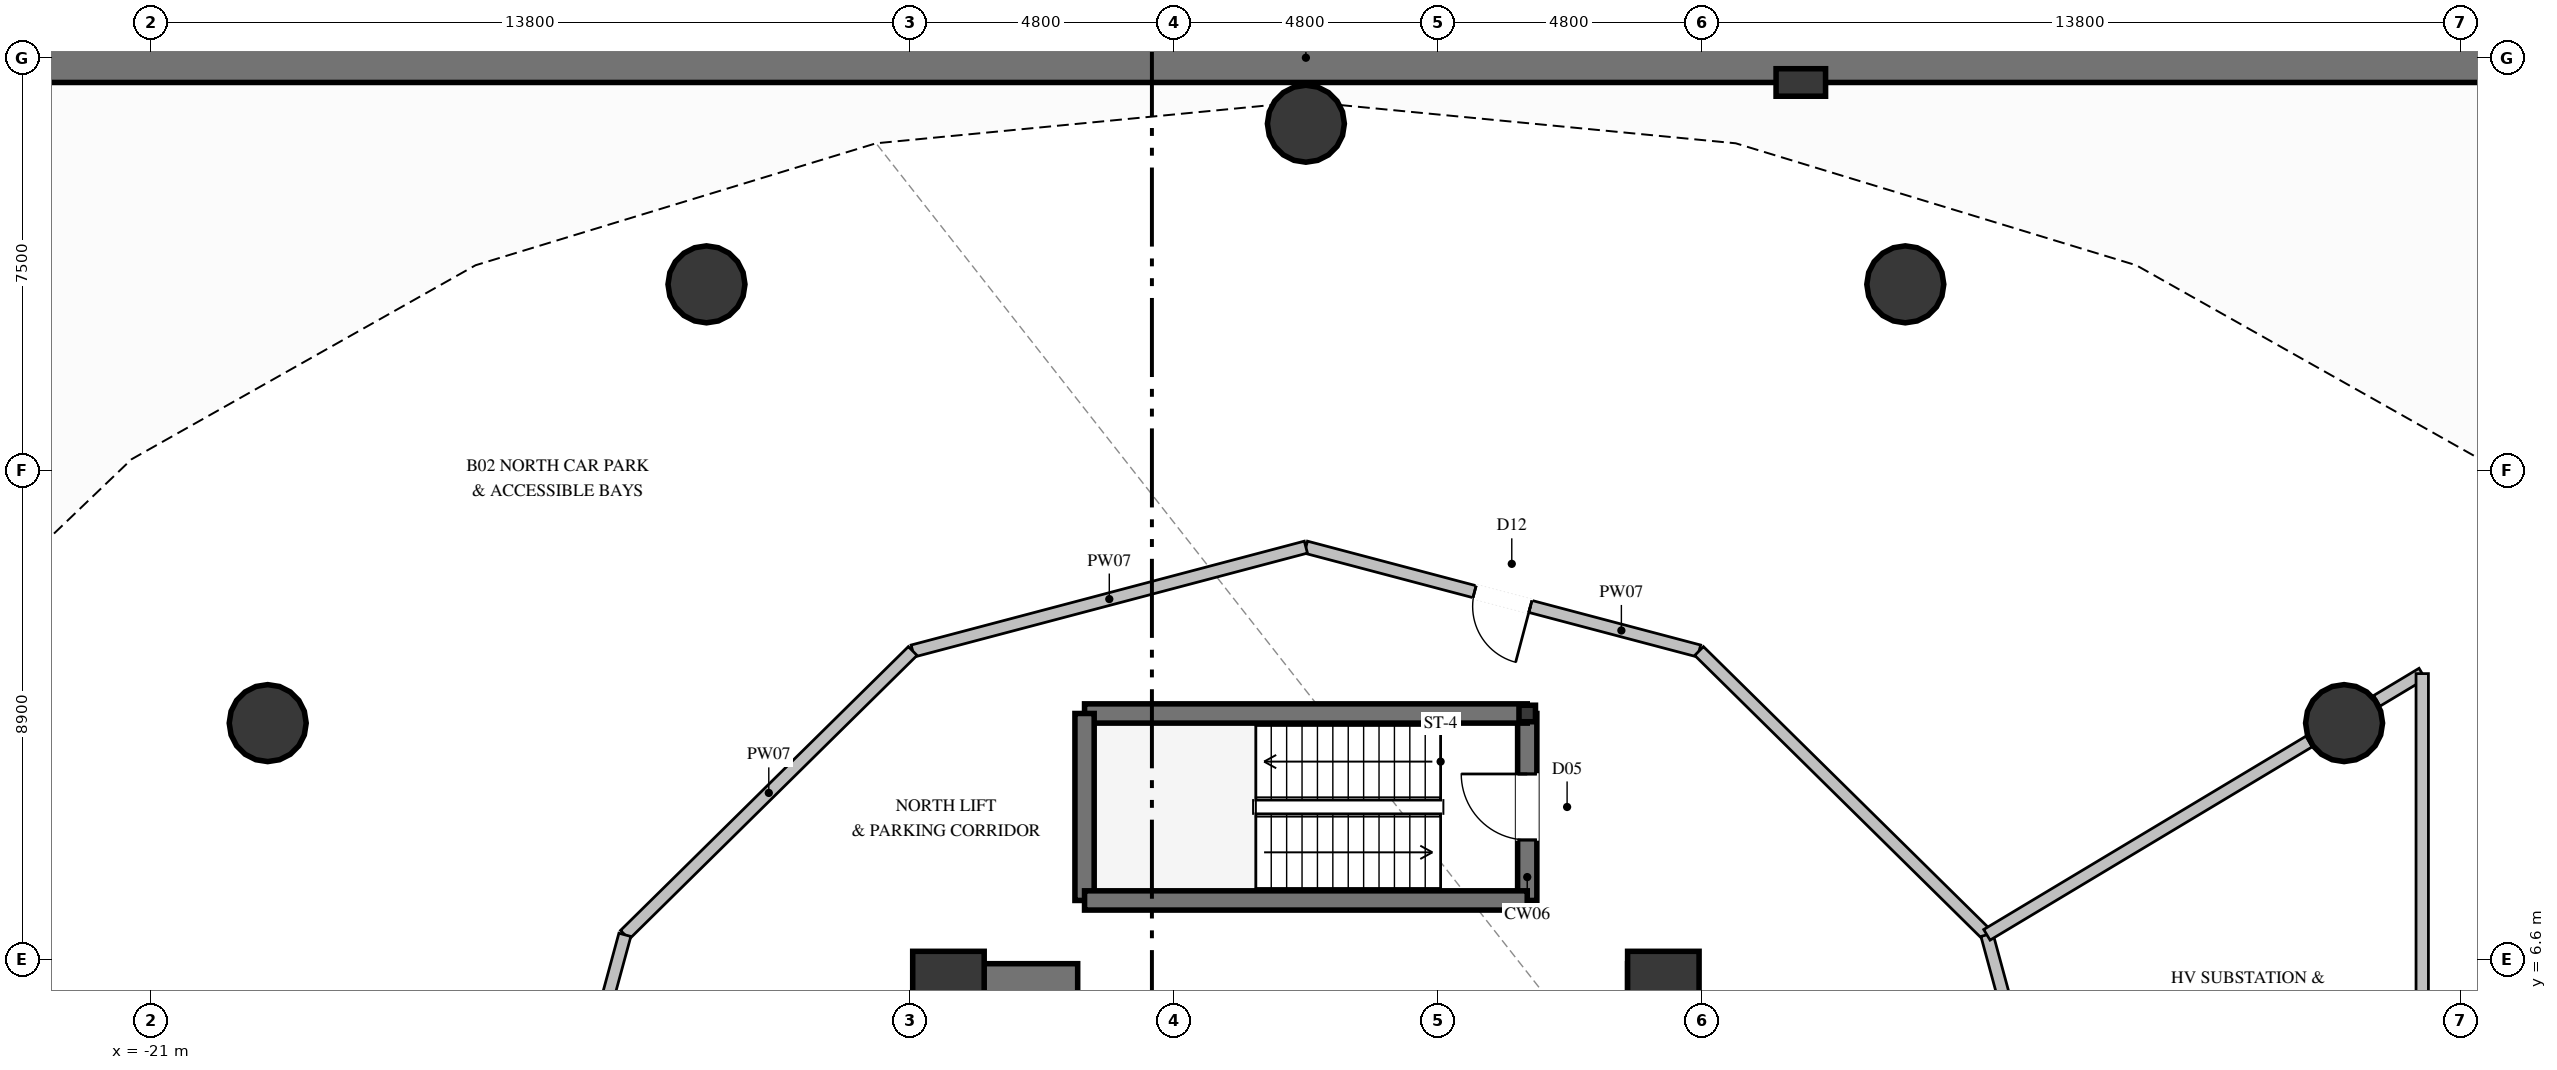
"""IFC4 building model, lengths in metres.
Left out: names, types, materials, properties, quantities, classifications, styles, units other than length and angle.
Written with IfcOpenShell. Run it as: python <this file> out.ifc"""

import sys

from ifc_helpers import new_model, si_unit, direction, frame, frame_2d, origin, origin_2d, place, context, subcontext, project, spatial, rectangle, hollow_rectangle, circle, extrude, element, fill, save


model = new_model("IFC4")
c1 = context("Model", 3, precision=1e-05, world=origin(), true_north=direction((0.0, 1.0)))
c2 = subcontext(c1, "Body", "Model", "MODEL_VIEW")
j1 = project(units=[si_unit("LENGTHUNIT", "METRE"), si_unit("PLANEANGLEUNIT", "RADIAN")], contexts=[c1])
p1 = place(None, origin())
s1 = spatial("IfcSite", under=j1, at=p1, CompositionType="ELEMENT")
p2 = place(p1, origin())
s2 = spatial("IfcBuilding", under=s1, at=p2, CompositionType="ELEMENT")
p3 = place(p2, frame((0.0, 0.0, -9.6)))
s3 = spatial("IfcBuildingStorey", under=s2, at=p3, CompositionType="ELEMENT", Elevation=-9.6)
p4 = place(p3, frame((31.45, 23.0, 0.0), z_axis=(0.0, 0.0, 1.0), x_axis=(-1.0, 0.0, 0.0)))
e1 = element("IfcWall", 1, at=p4, inside=s3, PredefinedType="SHEAR", context=c2, shape_type="SweptSolid", body=[
    extrude(rectangle(XDim=62.9, YDim=0.9, at=frame_2d((31.45, 0.0))), origin(), (0.0, 0.0, 1.0), 4.8),
])
p5 = place(p3, frame((9.0, 22.55, 0.0), z_axis=(0.0, 0.0, 1.0), x_axis=(0.0, 1.0, 0.0)))
e2 = element("IfcColumn", 2, at=p5, inside=s3, PredefinedType="PILASTER", context=c2, shape_type="SweptSolid", body=[
    extrude(rectangle(XDim=0.5, YDim=0.9, at=origin_2d()), origin(), (0.0, 0.0, 1.0), 4.8),
])
for number, where, z_axis, x_axis in (
    (3, (6.5, 6.1, 0.0), (0.0, 0.0, 1.0), (1.0, 0.0, 0.0)),
    (4, (-6.5, 6.1, 0.0), (0.0, 0.0, 1.0), (1.0, 0.0, 0.0)),
):
    element("IfcColumn", number, at=place(p3, frame(where, z_axis=z_axis, x_axis=x_axis)), inside=s3, PredefinedType="COLUMN", context=c2, shape_type="SweptSolid", body=[
        extrude(rectangle(XDim=1.3, YDim=1.3, at=origin_2d()), origin(), (0.0, 0.0, 1.0), 4.8),
    ])
p6 = place(p3, frame((-6.075, 6.1, 0.0), z_axis=(0.0, 0.0, 1.0), x_axis=(1.0, 0.0, 0.0)))
e5 = element("IfcWall", 5, at=p6, inside=s3, PredefinedType="SHEAR", context=c2, shape_type="SweptSolid", body=[
    extrude(rectangle(XDim=1.925, YDim=0.85, at=frame_2d((0.962, 0.0))), origin(), (0.0, 0.0, 1.0), 4.8),
])
p7 = place(p3, frame((5.85, 6.1, 0.0), z_axis=(0.0, 0.0, 1.0), x_axis=(1.0, 0.0, 0.0)))
e6 = element("IfcWall", 6, at=p7, inside=s3, PredefinedType="SHEAR", context=c2, shape_type="SweptSolid", body=[
    extrude(rectangle(XDim=0.225, YDim=0.85, at=frame_2d((0.112, 0.0))), origin(), (0.0, 0.0, 1.0), 4.8),
])
p8 = place(p3, frame((-6.5, 2.35, 0.0), z_axis=(0.0, 0.0, 1.0), x_axis=(0.0, 1.0, 0.0)))
e7 = element("IfcWall", 7, at=p8, inside=s3, PredefinedType="SHEAR", context=c2, shape_type="SweptSolid", body=[
    extrude(rectangle(XDim=4.175, YDim=0.85, at=frame_2d((2.087, 0.0))), origin(), (0.0, 0.0, 1.0), 4.8),
])
p9 = place(p3, frame((6.5, 3.35, 0.0), z_axis=(0.0, 0.0, 1.0), x_axis=(0.0, 1.0, 0.0)))
e8 = element("IfcWall", 8, at=p9, inside=s3, PredefinedType="SHEAR", context=c2, shape_type="SweptSolid", body=[
    extrude(rectangle(XDim=3.175, YDim=0.85, at=frame_2d((1.587, 0.0))), origin(), (0.0, 0.0, 1.0), 4.8),
])
for number, where, z_axis, x_axis in (
    (9, (18.879, 10.9, 0.0), (0.0, 0.0, 1.0), (1.0, 0.0, 0.0)),
    (10, (10.9, 18.879, 0.0), (0.0, 0.0, 1.0), (1.0, 0.0, 0.0)),
    (11, (0.0, 21.8, 0.0), (0.0, 0.0, 1.0), (1.0, 0.0, 0.0)),
    (12, (-10.9, 18.879, 0.0), (0.0, 0.0, 1.0), (1.0, 0.0, 0.0)),
    (13, (-18.879, 10.9, 0.0), (0.0, 0.0, 1.0), (1.0, 0.0, 0.0)),
):
    element("IfcColumn", number, at=place(p3, frame(where, z_axis=z_axis, x_axis=x_axis)), inside=s3, PredefinedType="COLUMN", context=c2, shape_type="SweptSolid", body=[
        extrude(circle(Radius=0.7, at=origin_2d()), origin(), (0.0, 0.0, 1.0), 4.8),
    ])
p10 = place(p3, frame((4.025, 11.075, 0.0), z_axis=(0.0, 0.0, 1.0), x_axis=(1.0, 0.0, 0.0)))
e14 = element("IfcColumn", 14, at=p10, inside=s3, PredefinedType="COLUMN", context=c2, shape_type="SweptSolid", body=[
    extrude(hollow_rectangle(XDim=0.3, YDim=0.3, WallThickness=0.016, at=origin_2d()), origin(), (0.0, 0.0, 1.0), 4.8),
])
p11 = place(p3, frame((4.025, 7.675, 0.0), z_axis=(0.0, 0.0, 1.0), x_axis=(0.0, 1.0, 0.0)))
e15 = element("IfcWall", 15, at=p11, inside=s3, PredefinedType="SOLIDWALL", context=c2, shape_type="SweptSolid", body=[
    extrude(rectangle(XDim=3.4, YDim=0.35, at=frame_2d((1.7, 0.0))), origin(), (0.0, 0.0, 1.0), 4.46),
])
p12 = place(p11, frame((1.1, 0.0, 0.0)))
e16 = element("IfcOpeningElement", 16, at=p12, cuts=e15, PredefinedType="OPENING", context=c2, shape_type="SweptSolid", body=[
    extrude(rectangle(XDim=1.2, YDim=2.2, at=frame_2d((0.6, 1.1))), frame((0.0, 0.185, 0.0), z_axis=(0.0, -1.0, 0.0), x_axis=(1.0, 0.0, 0.0)), (0.0, 0.0, 1.0), 0.37),
])
p13 = place(p3, frame((4.025, 11.075, 0.0), z_axis=(0.0, 0.0, 1.0), x_axis=(-1.0, 0.0, 0.0)))
e17 = element("IfcWall", 17, at=p13, inside=s3, PredefinedType="SOLIDWALL", context=c2, shape_type="SweptSolid", body=[
    extrude(rectangle(XDim=8.05, YDim=0.35, at=frame_2d((4.025, 0.0))), origin(), (0.0, 0.0, 1.0), 4.46),
])
p14 = place(p3, frame((-4.025, 11.075, 0.0), z_axis=(0.0, 0.0, 1.0), x_axis=(0.0, -1.0, 0.0)))
e18 = element("IfcWall", 18, at=p14, inside=s3, PredefinedType="SOLIDWALL", context=c2, shape_type="SweptSolid", body=[
    extrude(rectangle(XDim=3.4, YDim=0.35, at=frame_2d((1.7, 0.0))), origin(), (0.0, 0.0, 1.0), 4.46),
])
p15 = place(p3, frame((-4.025, 7.675, 0.0), z_axis=(0.0, 0.0, 1.0), x_axis=(1.0, 0.0, 0.0)))
e19 = element("IfcWall", 19, at=p15, inside=s3, PredefinedType="SOLIDWALL", context=c2, shape_type="SweptSolid", body=[
    extrude(rectangle(XDim=8.05, YDim=0.35, at=frame_2d((4.025, 0.0))), origin(), (0.0, 0.0, 1.0), 4.46),
])
p16 = place(p3, frame((7.15, 12.211, 0.0), z_axis=(0.0, 0.0, 1.0), x_axis=(-0.966820901533, 0.255455170937, 0.0)))
e20 = element("IfcWall", 20, at=p16, inside=s3, PredefinedType="PARTITIONING", context=c2, shape_type="SweptSolid", body=[
    extrude(rectangle(XDim=7.395, YDim=0.225, at=frame_2d((3.698, 0.0))), origin(), (0.0, 0.0, 1.0), 4.46),
])
p17 = place(p16, frame((3.173, 0.0, 0.0)))
e21 = element("IfcOpeningElement", 21, at=p17, cuts=e20, PredefinedType="OPENING", context=c2, shape_type="SweptSolid", body=[
    extrude(rectangle(XDim=1.05, YDim=2.15, at=frame_2d((0.525, 1.075))), frame((0.0, 0.123, 0.0), z_axis=(0.0, -1.0, 0.0), x_axis=(1.0, 0.0, 0.0)), (0.0, 0.0, 1.0), 0.245),
])
p18 = place(p3, frame((12.384, 7.05, 0.0), z_axis=(0.0, 0.0, 1.0), x_axis=(-0.712071304345, 0.702107155303, 0.0)))
e22 = element("IfcWall", 22, at=p18, inside=s3, PredefinedType="PARTITIONING", context=c2, shape_type="SweptSolid", body=[
    extrude(rectangle(XDim=7.351, YDim=0.225, at=frame_2d((3.675, 0.0))), origin(), (0.0, 0.0, 1.0), 4.46),
])
p19 = place(p3, frame((0.0, 14.1, 0.0), z_axis=(0.0, 0.0, 1.0), x_axis=(-0.966820901533, -0.255455170937, 0.0)))
e23 = element("IfcWall", 23, at=p19, inside=s3, PredefinedType="PARTITIONING", context=c2, shape_type="SweptSolid", body=[
    extrude(rectangle(XDim=7.395, YDim=0.225, at=frame_2d((3.698, 0.0))), origin(), (0.0, 0.0, 1.0), 4.46),
])
p20 = place(p3, frame((-7.15, 12.211, 0.0), z_axis=(0.0, 0.0, 1.0), x_axis=(-0.712071304345, -0.702107155303, 0.0)))
e24 = element("IfcWall", 24, at=p20, inside=s3, PredefinedType="PARTITIONING", context=c2, shape_type="SweptSolid", body=[
    extrude(rectangle(XDim=7.351, YDim=0.225, at=frame_2d((3.675, 0.0))), origin(), (0.0, 0.0, 1.0), 4.46),
])
p21 = place(p3, frame((-12.384, 7.05, 0.0), z_axis=(0.0, 0.0, 1.0), x_axis=(-0.262260528785, -0.964997106235, 0.0)))
e25 = element("IfcWall", 25, at=p21, inside=s3, PredefinedType="PARTITIONING", context=c2, shape_type="SweptSolid", body=[
    extrude(rectangle(XDim=7.306, YDim=0.225, at=frame_2d((3.653, 0.0))), origin(), (0.0, 0.0, 1.0), 4.46),
])
p22 = place(p21, frame((3.128, 0.0, 0.0)))
e26 = element("IfcOpeningElement", 26, at=p22, cuts=e25, PredefinedType="OPENING", context=c2, shape_type="SweptSolid", body=[
    extrude(rectangle(XDim=1.05, YDim=2.15, at=frame_2d((0.525, 1.075))), frame((0.0, 0.123, 0.0), z_axis=(0.0, -1.0, 0.0), x_axis=(1.0, 0.0, 0.0)), (0.0, 0.0, 1.0), 0.245),
])
p23 = place(p3, frame((14.3, 0.0, 0.0), z_axis=(0.0, 0.0, 1.0), x_axis=(-0.262260528785, 0.964997106235, 0.0)))
e27 = element("IfcWall", 27, at=p23, inside=s3, PredefinedType="PARTITIONING", context=c2, shape_type="SweptSolid", body=[
    extrude(rectangle(XDim=7.306, YDim=0.225, at=frame_2d((3.653, 0.0))), origin(), (0.0, 0.0, 1.0), 4.46),
])
p24 = place(p23, frame((3.128, 0.0, 0.0)))
e28 = element("IfcOpeningElement", 28, at=p24, cuts=e27, PredefinedType="OPENING", context=c2, shape_type="SweptSolid", body=[
    extrude(rectangle(XDim=1.05, YDim=2.15, at=frame_2d((0.525, 1.075))), frame((0.0, 0.123, 0.0), z_axis=(0.0, -1.0, 0.0), x_axis=(1.0, 0.0, 0.0)), (0.0, 0.0, 1.0), 0.245),
])
p25 = place(p3, frame((12.384, 7.05, 0.0), z_axis=(0.0, 0.0, 1.0), x_axis=(0.857483465664, 0.514511521846, 0.0)))
e29 = element("IfcWall", 29, at=p25, inside=s3, PredefinedType="PARTITIONING", context=c2, shape_type="SweptSolid", body=[
    extrude(rectangle(XDim=6.832, YDim=0.225, at=frame_2d((3.416, 0.0))), origin(), (0.0, 0.0, 1.0), 3.75),
])
p26 = place(p3, frame((19.475, 11.305, 0.0), z_axis=(0.0, 0.0, 1.0), x_axis=(0.857425748935, 0.51460770016, 0.0)))
e30 = element("IfcWall", 30, at=p26, inside=s3, PredefinedType="PARTITIONING", context=c2, shape_type="SweptSolid", body=[
    extrude(rectangle(XDim=0.962, YDim=0.225, at=frame_2d((0.481, 0.0))), origin(), (0.0, 0.0, 1.0), 3.695),
])
p27 = place(p3, frame((20.3, 11.8, 0.0), z_axis=(0.0, 0.0, 1.0), x_axis=(0.0, -1.0, 0.0)))
e31 = element("IfcWall", 31, at=p27, inside=s3, PredefinedType="PARTITIONING", context=c2, shape_type="SweptSolid", body=[
    extrude(rectangle(XDim=11.8, YDim=0.225, at=frame_2d((5.9, 0.0))), origin(), (0.0, 0.0, 1.0), 4.46),
])
p28 = place(p12, origin())
e32 = element("IfcDoor", 32, at=p28, inside=s3, OperationType="SINGLE_SWING_RIGHT", PredefinedType="DOOR", context=c2, shape_type="SweptSolid", body=[
    extrude(rectangle(XDim=1.2, YDim=2.2, at=frame_2d((0.6, 1.1))), frame((0.0, 0.025, 0.0), z_axis=(0.0, -1.0, 0.0), x_axis=(1.0, 0.0, 0.0)), (0.0, 0.0, 1.0), 0.05),
])
fill(e16, e32)
p29 = place(p17, origin())
e33 = element("IfcDoor", 33, at=p29, inside=s3, OperationType="SINGLE_SWING_LEFT", PredefinedType="DOOR", context=c2, shape_type="SweptSolid", body=[
    extrude(rectangle(XDim=1.05, YDim=2.15, at=frame_2d((0.525, 1.075))), frame((0.0, 0.025, 0.0), z_axis=(0.0, -1.0, 0.0), x_axis=(1.0, 0.0, 0.0)), (0.0, 0.0, 1.0), 0.05),
])
fill(e21, e33)
save(model, sys.argv[1])
